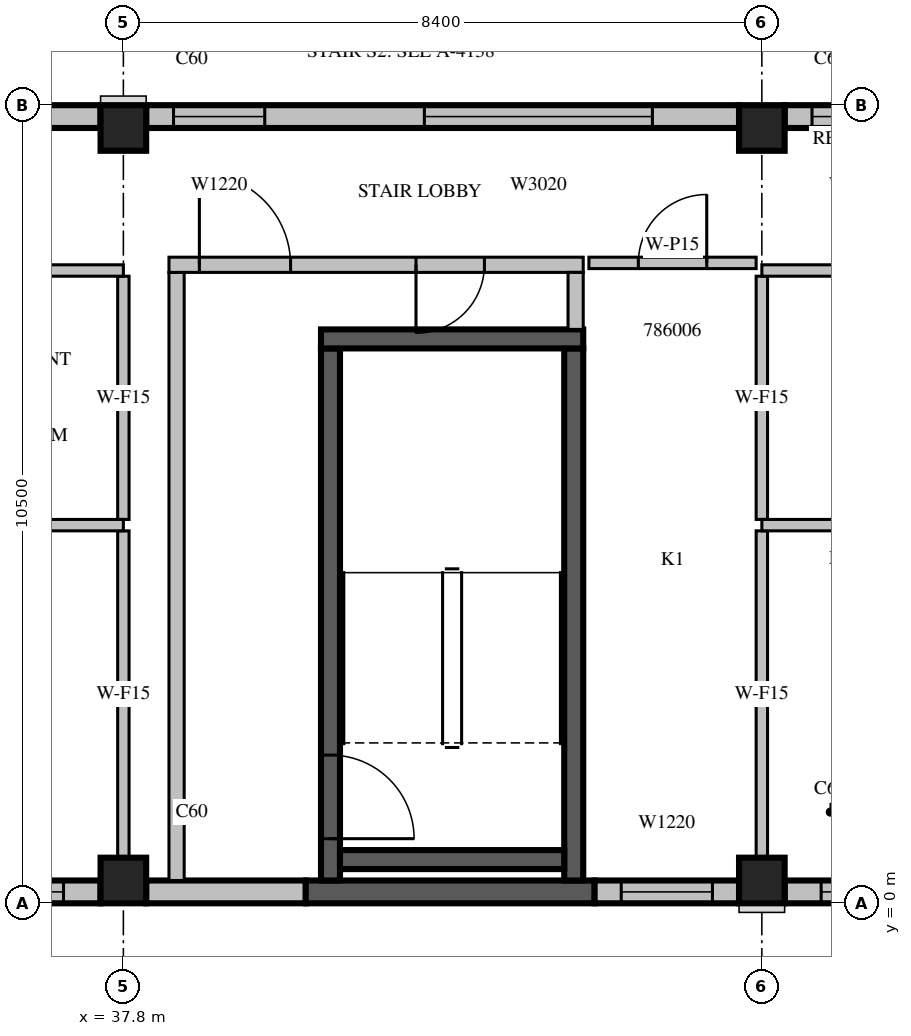
"""IFC4 building model, lengths in metres.
Left out: names, types, materials, properties, quantities, classifications, styles, units other than length and angle.
Written with IfcOpenShell. Run it as: python <this file> out.ifc"""

import sys

from ifc_helpers import new_model, si_unit, direction, frame, frame_2d, origin, origin_2d, place, context, subcontext, project, spatial, rectangle, extrude, source, transform, mapped, element, fill, save


model = new_model("IFC4")
c1 = context("Model", 3, precision=1e-05, world=origin(), true_north=direction((0.0, 1.0)))
c2 = subcontext(c1, "Body", "Model", "MODEL_VIEW")
j1 = project(units=[si_unit("LENGTHUNIT", "METRE"), si_unit("PLANEANGLEUNIT", "RADIAN")], contexts=[c1])
p1 = place(None, origin())
s1 = spatial("IfcSite", under=j1, at=p1, CompositionType="ELEMENT")
p2 = place(p1, origin())
s2 = spatial("IfcBuilding", under=s1, at=p2, CompositionType="ELEMENT")
p3 = place(p2, frame((0.0, 0.0, 361.5)))
s3 = spatial("IfcBuildingStorey", under=s2, at=p3, CompositionType="ELEMENT", Elevation=361.5)
m1 = source(origin(), c2, "Body", "SweptSolid", [
    extrude(rectangle(XDim=0.6, YDim=0.6, at=origin_2d()), origin(), (0.0, 0.0, 1.0), 3.5),
])
for number, where, z_axis, x_axis in (
    (1, (37.8, 0.3, 0.0), (0.0, 0.0, 1.0), (1.0, 0.0, 0.0)),
    (2, (46.2, 0.3, 0.0), (0.0, 0.0, 1.0), (1.0, 0.0, 0.0)),
    (3, (37.8, 10.2, 0.0), (0.0, 0.0, 1.0), (1.0, 0.0, 0.0)),
    (4, (46.2, 10.2, 0.0), (0.0, 0.0, 1.0), (1.0, 0.0, 0.0)),
):
    element("IfcColumn", number, at=place(p3, frame(where, z_axis=z_axis, x_axis=x_axis)), inside=s3, PredefinedType="COLUMN", context=c2, shape_type="MappedRepresentation", body=[
        mapped(m1, transform((0.0, 0.0, 0.0), scale=1.0)),
    ])
m2 = source(origin(), c2, "Body", "SweptSolid", [
    extrude(rectangle(XDim=7.8, YDim=0.3, at=frame_2d((3.9, 0.0))), origin(), (0.0, 0.0, 1.0), 3.1),
])
p4 = place(p3, frame((29.7, 0.15, 0.0), z_axis=(0.0, 0.0, 1.0), x_axis=(1.0, 0.0, 0.0)))
e5 = element("IfcWall", 5, at=p4, inside=s3, PredefinedType="STANDARD", context=c2, shape_type="MappedRepresentation", body=[
    mapped(m2, transform((0.0, 0.0, 0.0), scale=1.0)),
])
m3 = source(origin(), c2, "Body", "SweptSolid", [
    extrude(rectangle(XDim=1.2, YDim=2.0, at=frame_2d((0.6, 1.0))), frame((0.0, 0.16, 0.0), z_axis=(0.0, -1.0, 0.0), x_axis=(1.0, 0.0, 0.0)), (0.0, 0.0, 1.0), 0.32),
])
p5 = place(p4, frame((0.588, 0.0, 0.6)))
e6 = element("IfcOpeningElement", 6, at=p5, cuts=e5, PredefinedType="OPENING", context=c2, shape_type="MappedRepresentation", body=[
    mapped(m3, transform((0.0, 0.0, 0.0), scale=1.0)),
])
p6 = place(p4, frame((6.112, 0.0, 0.6)))
e7 = element("IfcOpeningElement", 7, at=p6, cuts=e5, PredefinedType="OPENING", context=c2, shape_type="MappedRepresentation", body=[
    mapped(m3, transform((0.0, 0.0, 0.0), scale=1.0)),
])
m4 = source(origin(), c2, "Body", "SweptSolid", [
    extrude(rectangle(XDim=2.4, YDim=2.0, at=frame_2d((1.2, 1.0))), frame((0.0, 0.16, 0.0), z_axis=(0.0, -1.0, 0.0), x_axis=(1.0, 0.0, 0.0)), (0.0, 0.0, 1.0), 0.32),
])
p7 = place(p4, frame((2.75, 0.0, 0.6)))
e8 = element("IfcOpeningElement", 8, at=p7, cuts=e5, PredefinedType="OPENING", context=c2, shape_type="MappedRepresentation", body=[
    mapped(m4, transform((0.0, 0.0, 0.0), scale=1.0)),
])
m5 = source(origin(), c2, "Body", "SweptSolid", [
    extrude(rectangle(XDim=2.1, YDim=0.3, at=frame_2d((1.05, 0.0))), origin(), (0.0, 0.0, 1.0), 3.1),
])
p8 = place(p3, frame((38.1, 0.15, 0.0), z_axis=(0.0, 0.0, 1.0), x_axis=(1.0, 0.0, 0.0)))
e9 = element("IfcWall", 9, at=p8, inside=s3, PredefinedType="STANDARD", context=c2, shape_type="MappedRepresentation", body=[
    mapped(m5, transform((0.0, 0.0, 0.0), scale=1.0)),
])
m6 = source(origin(), c2, "Body", "SweptSolid", [
    extrude(rectangle(XDim=3.8, YDim=0.3, at=frame_2d((1.9, 0.0))), origin(), (0.0, 0.0, 1.0), 3.1),
])
p9 = place(p3, frame((40.2, 0.15, 0.0), z_axis=(0.0, 0.0, 1.0), x_axis=(1.0, 0.0, 0.0)))
e10 = element("IfcWall", 10, at=p9, inside=s3, PredefinedType="SOLIDWALL", context=c2, shape_type="MappedRepresentation", body=[
    mapped(m6, transform((0.0, 0.0, 0.0), scale=1.0)),
])
m7 = source(origin(), c2, "Body", "SweptSolid", [
    extrude(rectangle(XDim=1.9, YDim=0.3, at=frame_2d((0.95, 0.0))), origin(), (0.0, 0.0, 1.0), 3.1),
])
p10 = place(p3, frame((44.0, 0.15, 0.0), z_axis=(0.0, 0.0, 1.0), x_axis=(1.0, 0.0, 0.0)))
e11 = element("IfcWall", 11, at=p10, inside=s3, PredefinedType="STANDARD", context=c2, shape_type="MappedRepresentation", body=[
    mapped(m7, transform((0.0, 0.0, 0.0), scale=1.0)),
])
p11 = place(p10, frame((0.35, 0.0, 0.6)))
e12 = element("IfcOpeningElement", 12, at=p11, cuts=e11, PredefinedType="OPENING", context=c2, shape_type="MappedRepresentation", body=[
    mapped(m3, transform((0.0, 0.0, 0.0), scale=1.0)),
])
m8 = source(origin(), c2, "Body", "SweptSolid", [
    extrude(rectangle(XDim=3.06, YDim=0.3, at=frame_2d((1.53, 0.0))), origin(), (0.0, 0.0, 1.0), 3.1),
])
p12 = place(p3, frame((46.5, 0.15, 0.0), z_axis=(0.0, 0.0, 1.0), x_axis=(1.0, 0.0, 0.0)))
e13 = element("IfcWall", 13, at=p12, inside=s3, PredefinedType="STANDARD", context=c2, shape_type="MappedRepresentation", body=[
    mapped(m8, transform((0.0, 0.0, 0.0), scale=1.0)),
])
m9 = source(origin(), c2, "Body", "SweptSolid", [
    extrude(rectangle(XDim=1.8, YDim=2.0, at=frame_2d((0.9, 1.0))), frame((0.0, 0.16, 0.0), z_axis=(0.0, -1.0, 0.0), x_axis=(1.0, 0.0, 0.0)), (0.0, 0.0, 1.0), 0.32),
])
p13 = place(p12, frame((0.48, 0.0, 0.6)))
e14 = element("IfcOpeningElement", 14, at=p13, cuts=e13, PredefinedType="OPENING", context=c2, shape_type="MappedRepresentation", body=[
    mapped(m9, transform((0.0, 0.0, 0.0), scale=1.0)),
])
p14 = place(p3, frame((49.56, 10.35, 0.0), z_axis=(0.0, 0.0, 1.0), x_axis=(-1.0, 0.0, 0.0)))
e15 = element("IfcWall", 15, at=p14, inside=s3, PredefinedType="STANDARD", context=c2, shape_type="MappedRepresentation", body=[
    mapped(m8, transform((0.0, 0.0, 0.0), scale=1.0)),
])
p15 = place(p14, frame((1.5, 0.0, 0.6)))
e16 = element("IfcOpeningElement", 16, at=p15, cuts=e15, PredefinedType="OPENING", context=c2, shape_type="MappedRepresentation", body=[
    mapped(m3, transform((0.0, 0.0, 0.0), scale=1.0)),
])
p16 = place(p3, frame((45.9, 10.35, 0.0), z_axis=(0.0, 0.0, 1.0), x_axis=(-1.0, 0.0, 0.0)))
e17 = element("IfcWall", 17, at=p16, inside=s3, PredefinedType="STANDARD", context=c2, shape_type="MappedRepresentation", body=[
    mapped(m2, transform((0.0, 0.0, 0.0), scale=1.0)),
])
m10 = source(origin(), c2, "Body", "SweptSolid", [
    extrude(rectangle(XDim=3.0, YDim=2.0, at=frame_2d((1.5, 1.0))), frame((0.0, 0.16, 0.0), z_axis=(0.0, -1.0, 0.0), x_axis=(1.0, 0.0, 0.0)), (0.0, 0.0, 1.0), 0.32),
])
p17 = place(p16, frame((1.14, 0.0, 0.6)))
e18 = element("IfcOpeningElement", 18, at=p17, cuts=e17, PredefinedType="OPENING", context=c2, shape_type="MappedRepresentation", body=[
    mapped(m10, transform((0.0, 0.0, 0.0), scale=1.0)),
])
p18 = place(p16, frame((6.24, 0.0, 0.6)))
e19 = element("IfcOpeningElement", 19, at=p18, cuts=e17, PredefinedType="OPENING", context=c2, shape_type="MappedRepresentation", body=[
    mapped(m3, transform((0.0, 0.0, 0.0), scale=1.0)),
])
p19 = place(p3, frame((37.5, 10.35, 0.0), z_axis=(0.0, 0.0, 1.0), x_axis=(-1.0, 0.0, 0.0)))
e20 = element("IfcWall", 20, at=p19, inside=s3, PredefinedType="STANDARD", context=c2, shape_type="MappedRepresentation", body=[
    mapped(m2, transform((0.0, 0.0, 0.0), scale=1.0)),
])
p20 = place(p19, frame((1.14, 0.0, 0.6)))
e21 = element("IfcOpeningElement", 21, at=p20, cuts=e20, PredefinedType="OPENING", context=c2, shape_type="MappedRepresentation", body=[
    mapped(m10, transform((0.0, 0.0, 0.0), scale=1.0)),
])
p21 = place(p19, frame((6.24, 0.0, 0.6)))
e22 = element("IfcOpeningElement", 22, at=p21, cuts=e20, PredefinedType="OPENING", context=c2, shape_type="MappedRepresentation", body=[
    mapped(m3, transform((0.0, 0.0, 0.0), scale=1.0)),
])
m11 = source(origin(), c2, "Body", "SweptSolid", [
    extrude(rectangle(XDim=7.0, YDim=0.25, at=frame_2d((3.5, 0.0))), origin(), (0.0, 0.0, 1.0), 3.1),
])
p22 = place(p3, frame((40.525, 0.3, 0.0), z_axis=(0.0, 0.0, 1.0), x_axis=(0.0, 1.0, 0.0)))
e23 = element("IfcWall", 23, at=p22, inside=s3, PredefinedType="SOLIDWALL", context=c2, shape_type="MappedRepresentation", body=[
    mapped(m11, transform((0.0, 0.0, 0.0), scale=1.0)),
])
m12 = source(origin(), c2, "Body", "SweptSolid", [
    extrude(rectangle(XDim=1.1, YDim=2.1, at=frame_2d((0.55, 1.05))), frame((0.0, 0.135, 0.0), z_axis=(0.0, -1.0, 0.0), x_axis=(1.0, 0.0, 0.0)), (0.0, 0.0, 1.0), 0.27),
])
p23 = place(p22, frame((0.55, 0.0, 0.0)))
e24 = element("IfcOpeningElement", 24, at=p23, cuts=e23, PredefinedType="OPENING", context=c2, shape_type="MappedRepresentation", body=[
    mapped(m12, transform((0.0, 0.0, 0.0), scale=1.0)),
])
p24 = place(p3, frame((43.725, 0.3, 0.0), z_axis=(0.0, 0.0, 1.0), x_axis=(0.0, 1.0, 0.0)))
e25 = element("IfcWall", 25, at=p24, inside=s3, PredefinedType="SOLIDWALL", context=c2, shape_type="MappedRepresentation", body=[
    mapped(m11, transform((0.0, 0.0, 0.0), scale=1.0)),
])
m13 = source(origin(), c2, "Body", "SweptSolid", [
    extrude(rectangle(XDim=3.45, YDim=0.25, at=frame_2d((1.725, 0.0))), origin(), (0.0, 0.0, 1.0), 3.1),
])
p25 = place(p3, frame((40.4, 7.425, 0.0), z_axis=(0.0, 0.0, 1.0), x_axis=(1.0, 0.0, 0.0)))
e26 = element("IfcWall", 26, at=p25, inside=s3, PredefinedType="SOLIDWALL", context=c2, shape_type="MappedRepresentation", body=[
    mapped(m13, transform((0.0, 0.0, 0.0), scale=1.0)),
])
m14 = source(origin(), c2, "Body", "SweptSolid", [
    extrude(rectangle(XDim=2.95, YDim=0.25, at=frame_2d((1.475, 0.0))), origin(), (0.0, 0.0, 1.0), 3.1),
])
p26 = place(p3, frame((40.65, 0.575, 0.0), z_axis=(0.0, 0.0, 1.0), x_axis=(1.0, 0.0, 0.0)))
e27 = element("IfcWall", 27, at=p26, inside=s3, PredefinedType="SOLIDWALL", context=c2, shape_type="MappedRepresentation", body=[
    mapped(m14, transform((0.0, 0.0, 0.0), scale=1.0)),
])
m15 = source(origin(), c2, "Body", "SweptSolid", [
    extrude(rectangle(XDim=8.0, YDim=0.2, at=frame_2d((4.0, 0.0))), origin(), (0.0, 0.0, 1.0), 3.1),
])
p27 = place(p3, frame((38.5, 0.3, 0.0), z_axis=(0.0, 0.0, 1.0), x_axis=(0.0, 1.0, 0.0)))
e28 = element("IfcWall", 28, at=p27, inside=s3, PredefinedType="PARTITIONING", context=c2, shape_type="MappedRepresentation", body=[
    mapped(m15, transform((0.0, 0.0, 0.0), scale=1.0)),
])
m16 = source(origin(), c2, "Body", "SweptSolid", [
    extrude(rectangle(XDim=5.45, YDim=0.2, at=frame_2d((2.725, 0.0))), origin(), (0.0, 0.0, 1.0), 3.1),
])
p28 = place(p3, frame((38.4, 8.4, 0.0), z_axis=(0.0, 0.0, 1.0), x_axis=(1.0, 0.0, 0.0)))
e29 = element("IfcWall", 29, at=p28, inside=s3, PredefinedType="PARTITIONING", context=c2, shape_type="MappedRepresentation", body=[
    mapped(m16, transform((0.0, 0.0, 0.0), scale=1.0)),
])
m17 = source(origin(), c2, "Body", "SweptSolid", [
    extrude(rectangle(XDim=1.2, YDim=2.1, at=frame_2d((0.6, 1.05))), frame((0.0, 0.11, 0.0), z_axis=(0.0, -1.0, 0.0), x_axis=(1.0, 0.0, 0.0)), (0.0, 0.0, 1.0), 0.22),
])
p29 = place(p28, frame((0.4, 0.0, 0.0)))
e30 = element("IfcOpeningElement", 30, at=p29, cuts=e29, PredefinedType="OPENING", context=c2, shape_type="MappedRepresentation", body=[
    mapped(m17, transform((0.0, 0.0, 0.0), scale=1.0)),
])
m18 = source(origin(), c2, "Body", "SweptSolid", [
    extrude(rectangle(XDim=0.9, YDim=2.1, at=frame_2d((0.45, 1.05))), frame((0.0, 0.11, 0.0), z_axis=(0.0, -1.0, 0.0), x_axis=(1.0, 0.0, 0.0)), (0.0, 0.0, 1.0), 0.22),
])
p30 = place(p28, frame((3.25, 0.0, 0.0)))
e31 = element("IfcOpeningElement", 31, at=p30, cuts=e29, PredefinedType="OPENING", context=c2, shape_type="MappedRepresentation", body=[
    mapped(m18, transform((0.0, 0.0, 0.0), scale=1.0)),
])
m19 = source(origin(), c2, "Body", "SweptSolid", [
    extrude(rectangle(XDim=0.75, YDim=0.2, at=frame_2d((0.375, 0.0))), origin(), (0.0, 0.0, 1.0), 3.1),
])
p31 = place(p3, frame((43.75, 7.55, 0.0), z_axis=(0.0, 0.0, 1.0), x_axis=(0.0, 1.0, 0.0)))
e32 = element("IfcWall", 32, at=p31, inside=s3, PredefinedType="PARTITIONING", context=c2, shape_type="MappedRepresentation", body=[
    mapped(m19, transform((0.0, 0.0, 0.0), scale=1.0)),
])
m20 = source(origin(), c2, "Body", "SweptSolid", [
    extrude(rectangle(XDim=2.2, YDim=0.15, at=frame_2d((1.1, 0.0))), origin(), (0.0, 0.0, 1.0), 3.1),
])
p32 = place(p3, frame((46.125, 8.425, 0.0), z_axis=(0.0, 0.0, 1.0), x_axis=(-1.0, 0.0, 0.0)))
e33 = element("IfcWall", 33, at=p32, inside=s3, PredefinedType="PARTITIONING", context=c2, shape_type="MappedRepresentation", body=[
    mapped(m20, transform((0.0, 0.0, 0.0), scale=1.0)),
])
m21 = source(origin(), c2, "Body", "SweptSolid", [
    extrude(rectangle(XDim=0.9, YDim=2.1, at=frame_2d((0.45, 1.05))), frame((0.0, 0.085, 0.0), z_axis=(0.0, -1.0, 0.0), x_axis=(1.0, 0.0, 0.0)), (0.0, 0.0, 1.0), 0.17),
])
p33 = place(p32, frame((0.65, 0.0, 0.0)))
e34 = element("IfcOpeningElement", 34, at=p33, cuts=e33, PredefinedType="OPENING", context=c2, shape_type="MappedRepresentation", body=[
    mapped(m21, transform((0.0, 0.0, 0.0), scale=1.0)),
])
m22 = source(origin(), c2, "Body", "SweptSolid", [
    extrude(rectangle(XDim=4.301, YDim=0.15, at=frame_2d((2.151, 0.0))), origin(), (0.0, 0.0, 1.0), 3.1),
])
p34 = place(p3, frame((37.8, 0.599, 0.0), z_axis=(0.0, 0.0, 1.0), x_axis=(0.0, 1.0, 0.0)))
e35 = element("IfcWall", 35, at=p34, inside=s3, PredefinedType="PARTITIONING", context=c2, shape_type="MappedRepresentation", body=[
    mapped(m22, transform((0.0, 0.0, 0.0), scale=1.0)),
])
m23 = source(origin(), c2, "Body", "SweptSolid", [
    extrude(rectangle(XDim=3.2, YDim=0.15, at=frame_2d((1.6, 0.0))), origin(), (0.0, 0.0, 1.0), 3.1),
])
p35 = place(p3, frame((37.8, 5.05, 0.0), z_axis=(0.0, 0.0, 1.0), x_axis=(0.0, 1.0, 0.0)))
e36 = element("IfcWall", 36, at=p35, inside=s3, PredefinedType="PARTITIONING", context=c2, shape_type="MappedRepresentation", body=[
    mapped(m23, transform((0.0, 0.0, 0.0), scale=1.0)),
])
m24 = source(origin(), c2, "Body", "SweptSolid", [
    extrude(rectangle(XDim=8.4, YDim=0.15, at=frame_2d((4.2, 0.0))), origin(), (0.0, 0.0, 1.0), 3.1),
])
p36 = place(p3, frame((37.8, 4.975, 0.0), z_axis=(0.0, 0.0, 1.0), x_axis=(-1.0, 0.0, 0.0)))
e37 = element("IfcWall", 37, at=p36, inside=s3, PredefinedType="PARTITIONING", context=c2, shape_type="MappedRepresentation", body=[
    mapped(m24, transform((0.0, 0.0, 0.0), scale=1.0)),
])
m25 = source(origin(), c2, "Body", "SweptSolid", [
    extrude(rectangle(XDim=1.0, YDim=2.1, at=frame_2d((0.5, 1.05))), frame((0.0, 0.085, 0.0), z_axis=(0.0, -1.0, 0.0), x_axis=(1.0, 0.0, 0.0)), (0.0, 0.0, 1.0), 0.17),
])
p37 = place(p36, frame((3.608, 0.0, 0.0)))
e38 = element("IfcOpeningElement", 38, at=p37, cuts=e37, PredefinedType="OPENING", context=c2, shape_type="MappedRepresentation", body=[
    mapped(m25, transform((0.0, 0.0, 0.0), scale=1.0)),
])
p38 = place(p3, frame((46.2, 0.599, 0.0), z_axis=(0.0, 0.0, 1.0), x_axis=(0.0, 1.0, 0.0)))
e39 = element("IfcWall", 39, at=p38, inside=s3, PredefinedType="PARTITIONING", context=c2, shape_type="MappedRepresentation", body=[
    mapped(m22, transform((0.0, 0.0, 0.0), scale=1.0)),
])
p39 = place(p3, frame((46.2, 5.05, 0.0), z_axis=(0.0, 0.0, 1.0), x_axis=(0.0, 1.0, 0.0)))
e40 = element("IfcWall", 40, at=p39, inside=s3, PredefinedType="PARTITIONING", context=c2, shape_type="MappedRepresentation", body=[
    mapped(m23, transform((0.0, 0.0, 0.0), scale=1.0)),
])
m26 = source(origin(), c2, "Body", "SweptSolid", [
    extrude(rectangle(XDim=3.06, YDim=0.15, at=frame_2d((1.53, 0.0))), origin(), (0.0, 0.0, 1.0), 3.1),
])
p40 = place(p3, frame((49.26, 4.975, 0.0), z_axis=(0.0, 0.0, 1.0), x_axis=(-1.0, 0.0, 0.0)))
e41 = element("IfcWall", 41, at=p40, inside=s3, PredefinedType="PARTITIONING", context=c2, shape_type="MappedRepresentation", body=[
    mapped(m26, transform((0.0, 0.0, 0.0), scale=1.0)),
])
p41 = place(p3, frame((37.8, 8.325, 0.0), z_axis=(0.0, 0.0, 1.0), x_axis=(-1.0, 0.0, 0.0)))
e42 = element("IfcWall", 42, at=p41, inside=s3, PredefinedType="PARTITIONING", context=c2, shape_type="MappedRepresentation", body=[
    mapped(m24, transform((0.0, 0.0, 0.0), scale=1.0)),
])
p42 = place(p41, frame((3.658, 0.0, 0.0)))
e43 = element("IfcOpeningElement", 43, at=p42, cuts=e42, PredefinedType="OPENING", context=c2, shape_type="MappedRepresentation", body=[
    mapped(m25, transform((0.0, 0.0, 0.0), scale=1.0)),
])
p43 = place(p3, frame((49.26, 8.325, 0.0), z_axis=(0.0, 0.0, 1.0), x_axis=(-1.0, 0.0, 0.0)))
e44 = element("IfcWall", 44, at=p43, inside=s3, PredefinedType="PARTITIONING", context=c2, shape_type="MappedRepresentation", body=[
    mapped(m26, transform((0.0, 0.0, 0.0), scale=1.0)),
])
p44 = place(p43, frame((0.993, 0.0, 0.0)))
e45 = element("IfcOpeningElement", 45, at=p44, cuts=e44, PredefinedType="OPENING", context=c2, shape_type="MappedRepresentation", body=[
    mapped(m25, transform((0.0, 0.0, 0.0), scale=1.0)),
])
m27 = source(origin(), c2, "Body", "SweptSolid", [
    extrude(rectangle(XDim=1.2, YDim=2.0, at=frame_2d((0.6, 1.0))), frame((0.0, 0.03, 0.0), z_axis=(0.0, -1.0, 0.0), x_axis=(1.0, 0.0, 0.0)), (0.0, 0.0, 1.0), 0.06),
])
p45 = place(p6, origin())
e46 = element("IfcWindow", 46, at=p45, inside=s3, PartitioningType="SINGLE_PANEL", PredefinedType="WINDOW", context=c2, shape_type="MappedRepresentation", body=[
    mapped(m27, transform((0.0, 0.0, 0.0), scale=1.0)),
])
fill(e7, e46)
p46 = place(p11, origin())
e47 = element("IfcWindow", 47, at=p46, inside=s3, PartitioningType="SINGLE_PANEL", PredefinedType="WINDOW", context=c2, shape_type="MappedRepresentation", body=[
    mapped(m27, transform((0.0, 0.0, 0.0), scale=1.0)),
])
fill(e12, e47)
m28 = source(origin(), c2, "Body", "SweptSolid", [
    extrude(rectangle(XDim=1.8, YDim=2.0, at=frame_2d((0.9, 1.0))), frame((0.0, 0.03, 0.0), z_axis=(0.0, -1.0, 0.0), x_axis=(1.0, 0.0, 0.0)), (0.0, 0.0, 1.0), 0.06),
])
p47 = place(p13, origin())
e48 = element("IfcWindow", 48, at=p47, inside=s3, PartitioningType="SINGLE_PANEL", PredefinedType="WINDOW", context=c2, shape_type="MappedRepresentation", body=[
    mapped(m28, transform((0.0, 0.0, 0.0), scale=1.0)),
])
fill(e14, e48)
p48 = place(p15, origin())
e49 = element("IfcWindow", 49, at=p48, inside=s3, PartitioningType="SINGLE_PANEL", PredefinedType="WINDOW", context=c2, shape_type="MappedRepresentation", body=[
    mapped(m27, transform((0.0, 0.0, 0.0), scale=1.0)),
])
fill(e16, e49)
m29 = source(origin(), c2, "Body", "SweptSolid", [
    extrude(rectangle(XDim=3.0, YDim=2.0, at=frame_2d((1.5, 1.0))), frame((0.0, 0.03, 0.0), z_axis=(0.0, -1.0, 0.0), x_axis=(1.0, 0.0, 0.0)), (0.0, 0.0, 1.0), 0.06),
])
p49 = place(p17, origin())
e50 = element("IfcWindow", 50, at=p49, inside=s3, PartitioningType="SINGLE_PANEL", PredefinedType="WINDOW", context=c2, shape_type="MappedRepresentation", body=[
    mapped(m29, transform((0.0, 0.0, 0.0), scale=1.0)),
])
fill(e18, e50)
p50 = place(p18, origin())
e51 = element("IfcWindow", 51, at=p50, inside=s3, PartitioningType="SINGLE_PANEL", PredefinedType="WINDOW", context=c2, shape_type="MappedRepresentation", body=[
    mapped(m27, transform((0.0, 0.0, 0.0), scale=1.0)),
])
fill(e19, e51)
m30 = source(origin(), c2, "Body", "SweptSolid", [
    extrude(rectangle(XDim=1.1, YDim=2.1, at=frame_2d((0.55, 1.05))), frame((0.0, 0.025, 0.0), z_axis=(0.0, -1.0, 0.0), x_axis=(1.0, 0.0, 0.0)), (0.0, 0.0, 1.0), 0.05),
])
p51 = place(p23, origin())
e52 = element("IfcDoor", 52, at=p51, inside=s3, OperationType="SINGLE_SWING_RIGHT", PredefinedType="DOOR", context=c2, shape_type="MappedRepresentation", body=[
    mapped(m30, transform((0.0, 0.0, 0.0), scale=1.0)),
])
fill(e24, e52)
m31 = source(origin(), c2, "Body", "SweptSolid", [
    extrude(rectangle(XDim=1.2, YDim=2.1, at=frame_2d((0.6, 1.05))), frame((0.0, 0.025, 0.0), z_axis=(0.0, -1.0, 0.0), x_axis=(1.0, 0.0, 0.0)), (0.0, 0.0, 1.0), 0.05),
])
p52 = place(p29, origin())
e53 = element("IfcDoor", 53, at=p52, inside=s3, OperationType="SINGLE_SWING_LEFT", PredefinedType="DOOR", context=c2, shape_type="MappedRepresentation", body=[
    mapped(m31, transform((0.0, 0.0, 0.0), scale=1.0)),
])
fill(e30, e53)
m32 = source(origin(), c2, "Body", "SweptSolid", [
    extrude(rectangle(XDim=0.9, YDim=2.1, at=frame_2d((0.45, 1.05))), frame((0.0, 0.025, 0.0), z_axis=(0.0, -1.0, 0.0), x_axis=(1.0, 0.0, 0.0)), (0.0, 0.0, 1.0), 0.05),
])
p53 = place(p30, origin())
e54 = element("IfcDoor", 54, at=p53, inside=s3, OperationType="SINGLE_SWING_RIGHT", PredefinedType="DOOR", context=c2, shape_type="MappedRepresentation", body=[
    mapped(m32, transform((0.0, 0.0, 0.0), scale=1.0)),
])
fill(e31, e54)
p54 = place(p33, origin())
e55 = element("IfcDoor", 55, at=p54, inside=s3, OperationType="SINGLE_SWING_RIGHT", PredefinedType="DOOR", context=c2, shape_type="MappedRepresentation", body=[
    mapped(m32, transform((0.0, 0.0, 0.0), scale=1.0)),
])
fill(e34, e55)
save(model, sys.argv[1])
